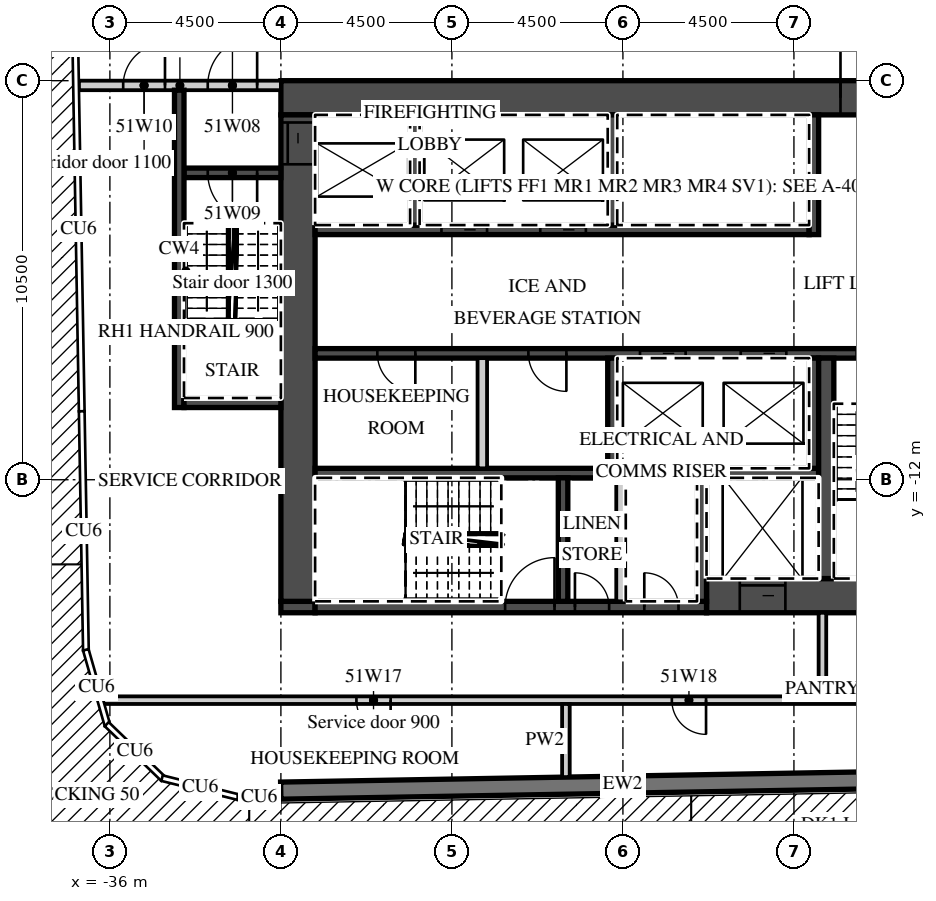
"""IFC4 building model, lengths in metres.
Left out: names, types, materials, properties, quantities, classifications, styles, units other than length and angle.
Written with IfcOpenShell. Run it as: python <this file> out.ifc"""

import sys

from ifc_helpers import new_model, si_unit, direction, frame, frame_2d, origin, place, context, subcontext, project, spatial, rectangle, extrude, element, fill, save


model = new_model("IFC4")
c1 = context("Model", 3, precision=1e-05, world=origin(), true_north=direction((0.0, 1.0)))
c2 = subcontext(c1, "Body", "Model", "MODEL_VIEW")
j1 = project(units=[si_unit("LENGTHUNIT", "METRE"), si_unit("PLANEANGLEUNIT", "RADIAN")], contexts=[c1])
p1 = place(None, origin())
s1 = spatial("IfcSite", under=j1, at=p1, CompositionType="ELEMENT")
p2 = place(p1, origin())
s2 = spatial("IfcBuilding", under=s1, at=p2, CompositionType="ELEMENT")
p3 = place(p2, frame((0.0, 0.0, 211.1)))
s3 = spatial("IfcBuildingStorey", under=s2, at=p3, CompositionType="ELEMENT", Elevation=211.1)
p4 = place(p3, frame((-31.504, -20.18, 0.0), z_axis=(0.0, 0.0, 1.0), x_axis=(0.999847677887, 0.017453395744, 0.0)))
e1 = element("IfcWall", 1, at=p4, inside=s3, PredefinedType="SOLIDWALL", context=c2, shape_type="SweptSolid", body=[
    extrude(rectangle(XDim=18.003, YDim=0.45, at=frame_2d((9.001, 0.0))), origin(), (0.0, 0.0, 1.0), 6.32),
])
p5 = place(p3, frame((-31.5, -1.95, 0.0), z_axis=(0.0, 0.0, 1.0), x_axis=(1.0, 0.0, 0.0)))
e2 = element("IfcWall", 2, at=p5, inside=s3, PredefinedType="SHEAR", context=c2, shape_type="SweptSolid", body=[
    extrude(rectangle(XDim=18.0, YDim=0.9, at=frame_2d((9.0, 0.0))), origin(), (0.0, 0.0, 1.0), 6.32),
])
p6 = place(p5, frame((14.725, 0.0, 0.0)))
e3 = element("IfcOpeningElement", 3, at=p6, cuts=e2, PredefinedType="OPENING", context=c2, shape_type="SweptSolid", body=[
    extrude(rectangle(XDim=1.8, YDim=2.1, at=frame_2d((0.9, 1.05))), frame((0.0, 0.46, 0.0), z_axis=(0.0, -1.0, 0.0), x_axis=(1.0, 0.0, 0.0)), (0.0, 0.0, 1.0), 0.92),
])
p7 = place(p3, frame((-20.3, -15.05, 0.0), z_axis=(0.0, 0.0, 1.0), x_axis=(1.0, 0.0, 0.0)))
e4 = element("IfcWall", 4, at=p7, inside=s3, PredefinedType="SHEAR", context=c2, shape_type="SweptSolid", body=[
    extrude(rectangle(XDim=6.8, YDim=0.9, at=frame_2d((3.4, 0.0))), origin(), (0.0, 0.0, 1.0), 6.32),
])
p8 = place(p7, frame((0.875, 0.0, 0.0)))
e5 = element("IfcOpeningElement", 5, at=p8, cuts=e4, PredefinedType="OPENING", context=c2, shape_type="SweptSolid", body=[
    extrude(rectangle(XDim=1.2, YDim=2.1, at=frame_2d((0.6, 1.05))), frame((0.0, 0.46, 0.0), z_axis=(0.0, -1.0, 0.0), x_axis=(1.0, 0.0, 0.0)), (0.0, 0.0, 1.0), 0.92),
])
p9 = place(p3, frame((-31.5, -15.35, 0.0), z_axis=(0.0, 0.0, 1.0), x_axis=(1.0, 0.0, 0.0)))
e6 = element("IfcWall", 6, at=p9, inside=s3, PredefinedType="SHEAR", context=c2, shape_type="SweptSolid", body=[
    extrude(rectangle(XDim=0.9, YDim=0.3, at=frame_2d((0.45, 0.0))), origin(), (0.0, 0.0, 1.0), 6.32),
])
p10 = place(p3, frame((-30.6, -15.35, 0.0), z_axis=(0.0, 0.0, 1.0), x_axis=(1.0, 0.0, 0.0)))
e7 = element("IfcWall", 7, at=p10, inside=s3, PredefinedType="SHEAR", context=c2, shape_type="SweptSolid", body=[
    extrude(rectangle(XDim=10.3, YDim=0.3, at=frame_2d((5.15, 0.0))), origin(), (0.0, 0.0, 1.0), 6.32),
])
p11 = place(p10, frame((5.0, 0.0, 0.0)))
e8 = element("IfcOpeningElement", 8, at=p11, cuts=e7, PredefinedType="OPENING", context=c2, shape_type="SweptSolid", body=[
    extrude(rectangle(XDim=1.3, YDim=2.1, at=frame_2d((0.65, 1.05))), frame((0.0, 0.16, 0.0), z_axis=(0.0, -1.0, 0.0), x_axis=(1.0, 0.0, 0.0)), (0.0, 0.0, 1.0), 0.32),
])
p12 = place(p10, frame((6.837, 0.0, 0.0)))
e9 = element("IfcOpeningElement", 9, at=p12, cuts=e7, PredefinedType="OPENING", context=c2, shape_type="SweptSolid", body=[
    extrude(rectangle(XDim=0.9, YDim=2.1, at=frame_2d((0.45, 1.05))), frame((0.0, 0.16, 0.0), z_axis=(0.0, -1.0, 0.0), x_axis=(1.0, 0.0, 0.0)), (0.0, 0.0, 1.0), 0.32),
])
p13 = place(p10, frame((8.663, 0.0, 0.0)))
e10 = element("IfcOpeningElement", 10, at=p13, cuts=e7, PredefinedType="OPENING", context=c2, shape_type="SweptSolid", body=[
    extrude(rectangle(XDim=0.9, YDim=2.1, at=frame_2d((0.45, 1.05))), frame((0.0, 0.16, 0.0), z_axis=(0.0, -1.0, 0.0), x_axis=(1.0, 0.0, 0.0)), (0.0, 0.0, 1.0), 0.32),
])
p14 = place(p3, frame((-31.05, -15.2, 0.0), z_axis=(0.0, 0.0, 1.0), x_axis=(0.0, 1.0, 0.0)))
e11 = element("IfcWall", 11, at=p14, inside=s3, PredefinedType="SHEAR", context=c2, shape_type="SweptSolid", body=[
    extrude(rectangle(XDim=12.8, YDim=0.9, at=frame_2d((6.4, 0.0))), origin(), (0.0, 0.0, 1.0), 6.32),
])
p15 = place(p14, frame((11.5, 0.0, 0.0)))
e12 = element("IfcOpeningElement", 12, at=p15, cuts=e11, PredefinedType="OPENING", context=c2, shape_type="SweptSolid", body=[
    extrude(rectangle(XDim=1.1, YDim=2.1, at=frame_2d((0.55, 1.05))), frame((0.0, 0.46, 0.0), z_axis=(0.0, -1.0, 0.0), x_axis=(1.0, 0.0, 0.0)), (0.0, 0.0, 1.0), 0.92),
])
p16 = place(p3, frame((-30.6, -5.425, 0.0), z_axis=(0.0, 0.0, 1.0), x_axis=(1.0, 0.0, 0.0)))
e13 = element("IfcWall", 13, at=p16, inside=s3, PredefinedType="SHEAR", context=c2, shape_type="SweptSolid", body=[
    extrude(rectangle(XDim=13.0, YDim=0.25, at=frame_2d((6.5, 0.0))), origin(), (0.0, 0.0, 1.0), 6.32),
])
p17 = place(p16, frame((3.325, 0.0, 0.0)))
e14 = element("IfcOpeningElement", 14, at=p17, cuts=e13, PredefinedType="OPENING", context=c2, shape_type="SweptSolid", body=[
    extrude(rectangle(XDim=1.2, YDim=2.1, at=frame_2d((0.6, 1.05))), frame((0.0, 0.135, 0.0), z_axis=(0.0, -1.0, 0.0), x_axis=(1.0, 0.0, 0.0)), (0.0, 0.0, 1.0), 0.27),
])
p18 = place(p16, frame((5.925, 0.0, 0.0)))
e15 = element("IfcOpeningElement", 15, at=p18, cuts=e13, PredefinedType="OPENING", context=c2, shape_type="SweptSolid", body=[
    extrude(rectangle(XDim=1.2, YDim=2.1, at=frame_2d((0.6, 1.05))), frame((0.0, 0.135, 0.0), z_axis=(0.0, -1.0, 0.0), x_axis=(1.0, 0.0, 0.0)), (0.0, 0.0, 1.0), 0.27),
])
p19 = place(p3, frame((-17.475, -5.55, 0.0), z_axis=(0.0, 0.0, 1.0), x_axis=(0.0, 1.0, 0.0)))
e16 = element("IfcWall", 16, at=p19, inside=s3, PredefinedType="SHEAR", context=c2, shape_type="SweptSolid", body=[
    extrude(rectangle(XDim=3.15, YDim=0.25, at=frame_2d((1.575, 0.0))), origin(), (0.0, 0.0, 1.0), 6.32),
])
for number, where, z_axis, x_axis in (
    (17, (-27.975, -5.3, 0.0), (0.0, 0.0, 1.0), (0.0, 1.0, 0.0)),
    (18, (-22.775, -5.3, 0.0), (0.0, 0.0, 1.0), (0.0, 1.0, 0.0)),
):
    element("IfcWall", number, at=place(p3, frame(where, z_axis=z_axis, x_axis=x_axis)), inside=s3, PredefinedType="SHEAR", context=c2, shape_type="SweptSolid", body=[
        extrude(rectangle(XDim=2.9, YDim=0.25, at=frame_2d((1.45, 0.0))), origin(), (0.0, 0.0, 1.0), 6.32),
    ])
p20 = place(p3, frame((-30.6, -8.675, 0.0), z_axis=(0.0, 0.0, 1.0), x_axis=(1.0, 0.0, 0.0)))
e19 = element("IfcWall", 19, at=p20, inside=s3, PredefinedType="SHEAR", context=c2, shape_type="SweptSolid", body=[
    extrude(rectangle(XDim=16.2, YDim=0.25, at=frame_2d((8.1, 0.0))), origin(), (0.0, 0.0, 1.0), 6.32),
])
p21 = place(p20, frame((8.55, 0.0, 0.0)))
e20 = element("IfcOpeningElement", 20, at=p21, cuts=e19, PredefinedType="OPENING", context=c2, shape_type="SweptSolid", body=[
    extrude(rectangle(XDim=1.2, YDim=2.1, at=frame_2d((0.6, 1.05))), frame((0.0, 0.135, 0.0), z_axis=(0.0, -1.0, 0.0), x_axis=(1.0, 0.0, 0.0)), (0.0, 0.0, 1.0), 0.27),
])
p22 = place(p20, frame((11.2, 0.0, 0.0)))
e21 = element("IfcOpeningElement", 21, at=p22, cuts=e19, PredefinedType="OPENING", context=c2, shape_type="SweptSolid", body=[
    extrude(rectangle(XDim=1.2, YDim=2.1, at=frame_2d((0.6, 1.05))), frame((0.0, 0.135, 0.0), z_axis=(0.0, -1.0, 0.0), x_axis=(1.0, 0.0, 0.0)), (0.0, 0.0, 1.0), 0.27),
])
p23 = place(p20, frame((14.25, 0.0, 0.0)))
e22 = element("IfcOpeningElement", 22, at=p23, cuts=e19, PredefinedType="OPENING", context=c2, shape_type="SweptSolid", body=[
    extrude(rectangle(XDim=1.3, YDim=2.1, at=frame_2d((0.65, 1.05))), frame((0.0, 0.135, 0.0), z_axis=(0.0, -1.0, 0.0), x_axis=(1.0, 0.0, 0.0)), (0.0, 0.0, 1.0), 0.27),
])
p24 = place(p20, frame((1.637, 0.0, 0.0)))
e23 = element("IfcOpeningElement", 23, at=p24, cuts=e19, PredefinedType="OPENING", context=c2, shape_type="SweptSolid", body=[
    extrude(rectangle(XDim=1.0, YDim=2.1, at=frame_2d((0.5, 1.05))), frame((0.0, 0.135, 0.0), z_axis=(0.0, -1.0, 0.0), x_axis=(1.0, 0.0, 0.0)), (0.0, 0.0, 1.0), 0.27),
])
p25 = place(p20, frame((5.613, 0.0, 0.0)))
e24 = element("IfcOpeningElement", 24, at=p25, cuts=e19, PredefinedType="OPENING", context=c2, shape_type="SweptSolid", body=[
    extrude(rectangle(XDim=1.0, YDim=2.1, at=frame_2d((0.5, 1.05))), frame((0.0, 0.135, 0.0), z_axis=(0.0, -1.0, 0.0), x_axis=(1.0, 0.0, 0.0)), (0.0, 0.0, 1.0), 0.27),
])
p26 = place(p3, frame((-30.6, -11.825, 0.0), z_axis=(0.0, 0.0, 1.0), x_axis=(1.0, 0.0, 0.0)))
e25 = element("IfcWall", 25, at=p26, inside=s3, PredefinedType="SHEAR", context=c2, shape_type="SweptSolid", body=[
    extrude(rectangle(XDim=13.25, YDim=0.25, at=frame_2d((6.625, 0.0))), origin(), (0.0, 0.0, 1.0), 6.32),
])
for number, where, z_axis, x_axis in (
    (26, (-17.475, -11.7, 0.0), (0.0, 0.0, 1.0), (0.0, 1.0, 0.0)),
    (27, (-22.775, -11.7, 0.0), (0.0, 0.0, 1.0), (0.0, 1.0, 0.0)),
):
    element("IfcWall", number, at=place(p3, frame(where, z_axis=z_axis, x_axis=x_axis)), inside=s3, PredefinedType="SHEAR", context=c2, shape_type="SweptSolid", body=[
        extrude(rectangle(XDim=2.9, YDim=0.25, at=frame_2d((1.45, 0.0))), origin(), (0.0, 0.0, 1.0), 6.32),
    ])
p27 = place(p3, frame((-26.2, -11.7, 0.0), z_axis=(0.0, 0.0, 1.0), x_axis=(0.0, 1.0, 0.0)))
e28 = element("IfcWall", 28, at=p27, inside=s3, PredefinedType="PARTITIONING", context=c2, shape_type="SweptSolid", body=[
    extrude(rectangle(XDim=2.9, YDim=0.25, at=frame_2d((1.45, 0.0))), origin(), (0.0, 0.0, 1.0), 6.32),
])
p28 = place(p3, frame((-17.15, -14.6, 0.0), z_axis=(0.0, 0.0, 1.0), x_axis=(0.0, 1.0, 0.0)))
e29 = element("IfcWall", 29, at=p28, inside=s3, PredefinedType="SHEAR", context=c2, shape_type="SweptSolid", body=[
    extrude(rectangle(XDim=5.8, YDim=0.4, at=frame_2d((2.9, 0.0))), origin(), (0.0, 0.0, 1.0), 6.32),
])
for number, where, z_axis, x_axis in (
    (30, (-20.425, -15.2, 0.0), (0.0, 0.0, 1.0), (0.0, 1.0, 0.0)),
    (31, (-24.075, -15.2, 0.0), (0.0, 0.0, 1.0), (0.0, 1.0, 0.0)),
):
    element("IfcWall", number, at=place(p3, frame(where, z_axis=z_axis, x_axis=x_axis)), inside=s3, PredefinedType="SHEAR", context=c2, shape_type="SweptSolid", body=[
        extrude(rectangle(XDim=3.25, YDim=0.25, at=frame_2d((1.625, 0.0))), origin(), (0.0, 0.0, 1.0), 6.32),
    ])
p29 = place(p3, frame((-22.55, -15.2, 0.0), z_axis=(0.0, 0.0, 1.0), x_axis=(0.0, 1.0, 0.0)))
e32 = element("IfcWall", 32, at=p29, inside=s3, PredefinedType="PARTITIONING", context=c2, shape_type="SweptSolid", body=[
    extrude(rectangle(XDim=3.25, YDim=0.25, at=frame_2d((1.625, 0.0))), origin(), (0.0, 0.0, 1.0), 6.32),
])
p30 = place(p3, frame((-36.815, -1.625, 0.0), z_axis=(0.0, 0.0, 1.0), x_axis=(1.0, 0.0, 0.0)))
e33 = element("IfcWall", 33, at=p30, inside=s3, PredefinedType="PARTITIONING", context=c2, shape_type="SweptSolid", body=[
    extrude(rectangle(XDim=5.315, YDim=0.25, at=frame_2d((2.658, 0.0))), origin(), (0.0, 0.0, 1.0), 6.32),
])
p31 = place(p30, frame((3.39, 0.0, 0.0)))
e34 = element("IfcOpeningElement", 34, at=p31, cuts=e33, PredefinedType="OPENING", context=c2, shape_type="SweptSolid", body=[
    extrude(rectangle(XDim=1.3, YDim=2.1, at=frame_2d((0.65, 1.05))), frame((0.0, 0.135, 0.0), z_axis=(0.0, -1.0, 0.0), x_axis=(1.0, 0.0, 0.0)), (0.0, 0.0, 1.0), 0.27),
])
p32 = place(p30, frame((1.166, 0.0, 0.0)))
e35 = element("IfcOpeningElement", 35, at=p32, cuts=e33, PredefinedType="OPENING", context=c2, shape_type="SweptSolid", body=[
    extrude(rectangle(XDim=1.1, YDim=2.1, at=frame_2d((0.55, 1.05))), frame((0.0, 0.135, 0.0), z_axis=(0.0, -1.0, 0.0), x_axis=(1.0, 0.0, 0.0)), (0.0, 0.0, 1.0), 0.27),
])
p33 = place(p3, frame((-34.05, -3.925, 0.0), z_axis=(0.0, 0.0, 1.0), x_axis=(1.0, 0.0, 0.0)))
e36 = element("IfcWall", 36, at=p33, inside=s3, PredefinedType="SHEAR", context=c2, shape_type="SweptSolid", body=[
    extrude(rectangle(XDim=2.55, YDim=0.25, at=frame_2d((1.275, 0.0))), origin(), (0.0, 0.0, 1.0), 6.32),
])
p34 = place(p33, frame((0.625, 0.0, 0.0)))
e37 = element("IfcOpeningElement", 37, at=p34, cuts=e36, PredefinedType="OPENING", context=c2, shape_type="SweptSolid", body=[
    extrude(rectangle(XDim=1.3, YDim=2.1, at=frame_2d((0.65, 1.05))), frame((0.0, 0.135, 0.0), z_axis=(0.0, -1.0, 0.0), x_axis=(1.0, 0.0, 0.0)), (0.0, 0.0, 1.0), 0.27),
])
p35 = place(p3, frame((-34.175, -10.1, 0.0), z_axis=(0.0, 0.0, 1.0), x_axis=(0.0, 1.0, 0.0)))
e38 = element("IfcWall", 38, at=p35, inside=s3, PredefinedType="SHEAR", context=c2, shape_type="SweptSolid", body=[
    extrude(rectangle(XDim=8.35, YDim=0.25, at=frame_2d((4.175, 0.0))), origin(), (0.0, 0.0, 1.0), 6.32),
])
p36 = place(p3, frame((-34.05, -9.975, 0.0), z_axis=(0.0, 0.0, 1.0), x_axis=(1.0, 0.0, 0.0)))
e39 = element("IfcWall", 39, at=p36, inside=s3, PredefinedType="SHEAR", context=c2, shape_type="SweptSolid", body=[
    extrude(rectangle(XDim=2.55, YDim=0.25, at=frame_2d((1.275, 0.0))), origin(), (0.0, 0.0, 1.0), 6.32),
])
p37 = place(p3, frame((-17.25, -17.7, 0.0), z_axis=(0.0, 0.0, 1.0), x_axis=(0.0, 1.0, 0.0)))
e40 = element("IfcWall", 40, at=p37, inside=s3, PredefinedType="PARTITIONING", context=c2, shape_type="SweptSolid", body=[
    extrude(rectangle(XDim=2.2, YDim=0.2, at=frame_2d((1.1, 0.0))), origin(), (0.0, 0.0, 1.0), 6.32),
])
p38 = place(p3, frame((-36.176, -17.8, 0.0), z_axis=(0.0, 0.0, 1.0), x_axis=(1.0, 0.0, 0.0)))
e41 = element("IfcWall", 41, at=p38, inside=s3, PredefinedType="PARTITIONING", context=c2, shape_type="SweptSolid", body=[
    extrude(rectangle(XDim=22.576, YDim=0.2, at=frame_2d((11.288, 0.0))), origin(), (0.0, 0.0, 1.0), 6.32),
])
p39 = place(p38, frame((6.663, 0.0, 0.0)))
e42 = element("IfcOpeningElement", 42, at=p39, cuts=e41, PredefinedType="OPENING", context=c2, shape_type="SweptSolid", body=[
    extrude(rectangle(XDim=0.9, YDim=2.1, at=frame_2d((0.45, 1.05))), frame((0.0, 0.11, 0.0), z_axis=(0.0, -1.0, 0.0), x_axis=(1.0, 0.0, 0.0)), (0.0, 0.0, 1.0), 0.22),
])
p40 = place(p38, frame((14.963, 0.0, 0.0)))
e43 = element("IfcOpeningElement", 43, at=p40, cuts=e41, PredefinedType="OPENING", context=c2, shape_type="SweptSolid", body=[
    extrude(rectangle(XDim=0.9, YDim=2.1, at=frame_2d((0.45, 1.05))), frame((0.0, 0.11, 0.0), z_axis=(0.0, -1.0, 0.0), x_axis=(1.0, 0.0, 0.0)), (0.0, 0.0, 1.0), 0.22),
])
p41 = place(p3, frame((-24.0, -19.824, 0.0), z_axis=(0.0, 0.0, 1.0), x_axis=(0.0, 1.0, 0.0)))
e44 = element("IfcWall", 44, at=p41, inside=s3, PredefinedType="PARTITIONING", context=c2, shape_type="SweptSolid", body=[
    extrude(rectangle(XDim=1.925, YDim=0.2, at=frame_2d((0.962, 0.0))), origin(), (0.0, 0.0, 1.0), 6.32),
])
p42 = place(p21, origin())
e45 = element("IfcDoor", 45, at=p42, inside=s3, OperationType="SLIDING_TO_LEFT", PredefinedType="DOOR", context=c2, shape_type="SweptSolid", body=[
    extrude(rectangle(XDim=1.2, YDim=2.1, at=frame_2d((0.6, 1.05))), frame((0.0, 0.025, 0.0), z_axis=(0.0, -1.0, 0.0), x_axis=(1.0, 0.0, 0.0)), (0.0, 0.0, 1.0), 0.05),
])
fill(e20, e45)
p43 = place(p22, origin())
e46 = element("IfcDoor", 46, at=p43, inside=s3, OperationType="SLIDING_TO_RIGHT", PredefinedType="DOOR", context=c2, shape_type="SweptSolid", body=[
    extrude(rectangle(XDim=1.2, YDim=2.1, at=frame_2d((0.6, 1.05))), frame((0.0, 0.025, 0.0), z_axis=(0.0, -1.0, 0.0), x_axis=(1.0, 0.0, 0.0)), (0.0, 0.0, 1.0), 0.05),
])
fill(e21, e46)
p44 = place(p17, origin())
e47 = element("IfcDoor", 47, at=p44, inside=s3, OperationType="SLIDING_TO_RIGHT", PredefinedType="DOOR", context=c2, shape_type="SweptSolid", body=[
    extrude(rectangle(XDim=1.2, YDim=2.1, at=frame_2d((0.6, 1.05))), frame((0.0, 0.025, 0.0), z_axis=(0.0, -1.0, 0.0), x_axis=(1.0, 0.0, 0.0)), (0.0, 0.0, 1.0), 0.05),
])
fill(e14, e47)
p45 = place(p18, origin())
e48 = element("IfcDoor", 48, at=p45, inside=s3, OperationType="SLIDING_TO_RIGHT", PredefinedType="DOOR", context=c2, shape_type="SweptSolid", body=[
    extrude(rectangle(XDim=1.2, YDim=2.1, at=frame_2d((0.6, 1.05))), frame((0.0, 0.025, 0.0), z_axis=(0.0, -1.0, 0.0), x_axis=(1.0, 0.0, 0.0)), (0.0, 0.0, 1.0), 0.05),
])
fill(e15, e48)
p46 = place(p8, origin())
e49 = element("IfcDoor", 49, at=p46, inside=s3, OperationType="SLIDING_TO_LEFT", PredefinedType="DOOR", context=c2, shape_type="SweptSolid", body=[
    extrude(rectangle(XDim=1.2, YDim=2.1, at=frame_2d((0.6, 1.05))), frame((0.0, 0.025, 0.0), z_axis=(0.0, -1.0, 0.0), x_axis=(1.0, 0.0, 0.0)), (0.0, 0.0, 1.0), 0.05),
])
fill(e5, e49)
p47 = place(p15, origin())
e50 = element("IfcDoor", 50, at=p47, inside=s3, OperationType="SLIDING_TO_RIGHT", PredefinedType="DOOR", context=c2, shape_type="SweptSolid", body=[
    extrude(rectangle(XDim=1.1, YDim=2.1, at=frame_2d((0.55, 1.05))), frame((0.0, 0.025, 0.0), z_axis=(0.0, -1.0, 0.0), x_axis=(1.0, 0.0, 0.0)), (0.0, 0.0, 1.0), 0.05),
])
fill(e12, e50)
p48 = place(p6, origin())
e51 = element("IfcDoor", 51, at=p48, inside=s3, OperationType="DOUBLE_DOOR_DOUBLE_SWING", PredefinedType="DOOR", context=c2, shape_type="SweptSolid", body=[
    extrude(rectangle(XDim=1.8, YDim=2.1, at=frame_2d((0.9, 1.05))), frame((0.0, 0.025, 0.0), z_axis=(0.0, -1.0, 0.0), x_axis=(1.0, 0.0, 0.0)), (0.0, 0.0, 1.0), 0.05),
])
fill(e3, e51)
p49 = place(p31, origin())
e52 = element("IfcDoor", 52, at=p49, inside=s3, OperationType="SINGLE_SWING_RIGHT", PredefinedType="DOOR", context=c2, shape_type="SweptSolid", body=[
    extrude(rectangle(XDim=1.3, YDim=2.1, at=frame_2d((0.65, 1.05))), frame((0.0, 0.025, 0.0), z_axis=(0.0, -1.0, 0.0), x_axis=(1.0, 0.0, 0.0)), (0.0, 0.0, 1.0), 0.05),
])
fill(e34, e52)
p50 = place(p34, origin())
e53 = element("IfcDoor", 53, at=p50, inside=s3, OperationType="SINGLE_SWING_RIGHT", PredefinedType="DOOR", context=c2, shape_type="SweptSolid", body=[
    extrude(rectangle(XDim=1.3, YDim=2.1, at=frame_2d((0.65, 1.05))), frame((0.0, 0.025, 0.0), z_axis=(0.0, -1.0, 0.0), x_axis=(1.0, 0.0, 0.0)), (0.0, 0.0, 1.0), 0.05),
])
fill(e37, e53)
p51 = place(p32, origin())
e54 = element("IfcDoor", 54, at=p51, inside=s3, OperationType="SINGLE_SWING_RIGHT", PredefinedType="DOOR", context=c2, shape_type="SweptSolid", body=[
    extrude(rectangle(XDim=1.1, YDim=2.1, at=frame_2d((0.55, 1.05))), frame((0.0, 0.025, 0.0), z_axis=(0.0, -1.0, 0.0), x_axis=(1.0, 0.0, 0.0)), (0.0, 0.0, 1.0), 0.05),
])
fill(e35, e54)
p52 = place(p23, origin())
e55 = element("IfcDoor", 55, at=p52, inside=s3, OperationType="SINGLE_SWING_RIGHT", PredefinedType="DOOR", context=c2, shape_type="SweptSolid", body=[
    extrude(rectangle(XDim=1.3, YDim=2.1, at=frame_2d((0.65, 1.05))), frame((0.0, 0.025, 0.0), z_axis=(0.0, -1.0, 0.0), x_axis=(1.0, 0.0, 0.0)), (0.0, 0.0, 1.0), 0.05),
])
fill(e22, e55)
p53 = place(p11, origin())
e56 = element("IfcDoor", 56, at=p53, inside=s3, OperationType="SINGLE_SWING_RIGHT", PredefinedType="DOOR", context=c2, shape_type="SweptSolid", body=[
    extrude(rectangle(XDim=1.3, YDim=2.1, at=frame_2d((0.65, 1.05))), frame((0.0, 0.025, 0.0), z_axis=(0.0, -1.0, 0.0), x_axis=(1.0, 0.0, 0.0)), (0.0, 0.0, 1.0), 0.05),
])
fill(e8, e56)
p54 = place(p12, origin())
e57 = element("IfcDoor", 57, at=p54, inside=s3, OperationType="SINGLE_SWING_LEFT", PredefinedType="DOOR", context=c2, shape_type="SweptSolid", body=[
    extrude(rectangle(XDim=0.9, YDim=2.1, at=frame_2d((0.45, 1.05))), frame((0.0, 0.025, 0.0), z_axis=(0.0, -1.0, 0.0), x_axis=(1.0, 0.0, 0.0)), (0.0, 0.0, 1.0), 0.05),
])
fill(e9, e57)
p55 = place(p13, origin())
e58 = element("IfcDoor", 58, at=p55, inside=s3, OperationType="SINGLE_SWING_LEFT", PredefinedType="DOOR", context=c2, shape_type="SweptSolid", body=[
    extrude(rectangle(XDim=0.9, YDim=2.1, at=frame_2d((0.45, 1.05))), frame((0.0, 0.025, 0.0), z_axis=(0.0, -1.0, 0.0), x_axis=(1.0, 0.0, 0.0)), (0.0, 0.0, 1.0), 0.05),
])
fill(e10, e58)
p56 = place(p24, origin())
e59 = element("IfcDoor", 59, at=p56, inside=s3, OperationType="SINGLE_SWING_RIGHT", PredefinedType="DOOR", context=c2, shape_type="SweptSolid", body=[
    extrude(rectangle(XDim=1.0, YDim=2.1, at=frame_2d((0.5, 1.05))), frame((0.0, 0.025, 0.0), z_axis=(0.0, -1.0, 0.0), x_axis=(1.0, 0.0, 0.0)), (0.0, 0.0, 1.0), 0.05),
])
fill(e23, e59)
p57 = place(p25, origin())
e60 = element("IfcDoor", 60, at=p57, inside=s3, OperationType="SINGLE_SWING_RIGHT", PredefinedType="DOOR", context=c2, shape_type="SweptSolid", body=[
    extrude(rectangle(XDim=1.0, YDim=2.1, at=frame_2d((0.5, 1.05))), frame((0.0, 0.025, 0.0), z_axis=(0.0, -1.0, 0.0), x_axis=(1.0, 0.0, 0.0)), (0.0, 0.0, 1.0), 0.05),
])
fill(e24, e60)
p58 = place(p39, origin())
e61 = element("IfcDoor", 61, at=p58, inside=s3, OperationType="SINGLE_SWING_RIGHT", PredefinedType="DOOR", context=c2, shape_type="SweptSolid", body=[
    extrude(rectangle(XDim=0.9, YDim=2.1, at=frame_2d((0.45, 1.05))), frame((0.0, 0.025, 0.0), z_axis=(0.0, -1.0, 0.0), x_axis=(1.0, 0.0, 0.0)), (0.0, 0.0, 1.0), 0.05),
])
fill(e42, e61)
p59 = place(p40, origin())
e62 = element("IfcDoor", 62, at=p59, inside=s3, OperationType="SINGLE_SWING_RIGHT", PredefinedType="DOOR", context=c2, shape_type="SweptSolid", body=[
    extrude(rectangle(XDim=0.9, YDim=2.1, at=frame_2d((0.45, 1.05))), frame((0.0, 0.025, 0.0), z_axis=(0.0, -1.0, 0.0), x_axis=(1.0, 0.0, 0.0)), (0.0, 0.0, 1.0), 0.05),
])
fill(e43, e62)
save(model, sys.argv[1])
